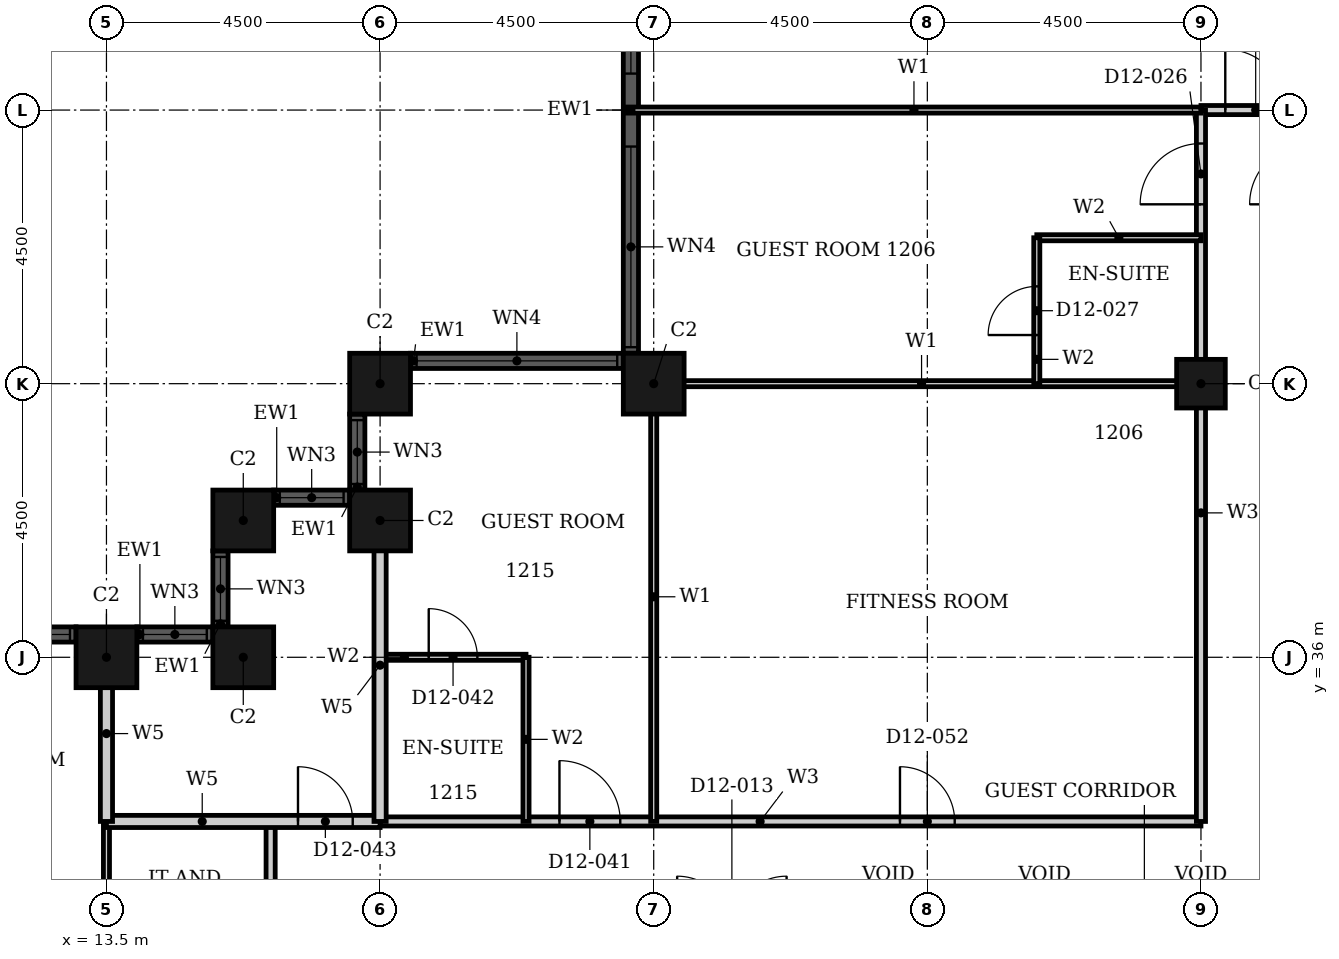
"""IFC4 building model, lengths in metres.
Left out: names, types, materials, properties, quantities, classifications, styles, units other than length and angle.
Written with IfcOpenShell. Run it as: python <this file> out.ifc"""

import sys

from ifc_helpers import new_model, si_unit, direction, frame, frame_2d, origin, origin_2d, place, context, subcontext, project, spatial, rectangle, hollow_rectangle, extrude, element, fill, save


model = new_model("IFC4")
c1 = context("Model", 3, precision=1e-05, world=origin(), true_north=direction((0.0, 1.0)))
c2 = subcontext(c1, "Body", "Model", "MODEL_VIEW")
j1 = project(units=[si_unit("LENGTHUNIT", "METRE"), si_unit("PLANEANGLEUNIT", "RADIAN")], contexts=[c1])
p1 = place(None, origin())
s1 = spatial("IfcSite", under=j1, at=p1, CompositionType="ELEMENT")
p2 = place(p1, origin())
s2 = spatial("IfcBuilding", under=s1, at=p2, CompositionType="ELEMENT")
p3 = place(p2, frame((0.0, 0.0, 56.4)))
s3 = spatial("IfcBuildingStorey", under=s2, at=p3, CompositionType="ELEMENT", Elevation=56.4)
for number, where, z_axis, x_axis in (
    (1, (22.5, 40.5, 0.0), (0.0, 0.0, 1.0), (1.0, 0.0, 0.0)),
    (2, (18.0, 40.5, 0.0), (0.0, 0.0, 1.0), (1.0, 0.0, 0.0)),
    (3, (18.0, 38.25, 0.0), (0.0, 0.0, 1.0), (1.0, 0.0, 0.0)),
    (4, (15.75, 38.25, 0.0), (0.0, 0.0, 1.0), (1.0, 0.0, 0.0)),
    (5, (15.75, 36.0, 0.0), (0.0, 0.0, 1.0), (1.0, 0.0, 0.0)),
    (6, (13.5, 36.0, 0.0), (0.0, 0.0, 1.0), (1.0, 0.0, 0.0)),
):
    element("IfcColumn", number, at=place(p3, frame(where, z_axis=z_axis, x_axis=x_axis)), inside=s3, PredefinedType="COLUMN", context=c2, shape_type="SweptSolid", body=[
        extrude(hollow_rectangle(XDim=1.0, YDim=1.0, WallThickness=0.032, at=origin_2d()), origin(), (0.0, 0.0, 1.0), 3.6),
    ])
p4 = place(p3, frame((31.5, 40.5, 0.0), z_axis=(0.0, 0.0, 1.0), x_axis=(1.0, 0.0, 0.0)))
e7 = element("IfcColumn", 7, at=p4, inside=s3, PredefinedType="COLUMN", context=c2, shape_type="SweptSolid", body=[
    extrude(hollow_rectangle(XDim=0.8, YDim=0.8, WallThickness=0.025, at=origin_2d()), origin(), (0.0, 0.0, 1.0), 3.6),
])
p5 = place(p3, frame((22.125, 49.0, 0.0), z_axis=(0.0, 0.0, 1.0), x_axis=(0.0, -1.0, 0.0)))
e8 = element("IfcWall", 8, at=p5, inside=s3, PredefinedType="SOLIDWALL", context=c2, shape_type="SweptSolid", body=[
    extrude(rectangle(XDim=8.0, YDim=0.25, at=frame_2d((4.0, 0.0))), origin(), (0.0, 0.0, 1.0), 3.6),
])
p6 = place(p5, frame((0.1, 0.0, 0.9)))
e9 = element("IfcOpeningElement", 9, at=p6, cuts=e8, PredefinedType="OPENING", context=c2, shape_type="SweptSolid", body=[
    extrude(rectangle(XDim=3.3, YDim=2.08, at=frame_2d((1.65, 1.04))), frame((0.0, 0.135, 0.0), z_axis=(0.0, -1.0, 0.0), x_axis=(1.0, 0.0, 0.0)), (0.0, 0.0, 1.0), 0.27),
])
p7 = place(p5, frame((4.6, 0.0, 0.9)))
e10 = element("IfcOpeningElement", 10, at=p7, cuts=e8, PredefinedType="OPENING", context=c2, shape_type="SweptSolid", body=[
    extrude(rectangle(XDim=3.3, YDim=2.08, at=frame_2d((1.65, 1.04))), frame((0.0, 0.135, 0.0), z_axis=(0.0, -1.0, 0.0), x_axis=(1.0, 0.0, 0.0)), (0.0, 0.0, 1.0), 0.27),
])
p8 = place(p3, frame((22.0, 40.875, 0.0), z_axis=(0.0, 0.0, 1.0), x_axis=(-1.0, 0.0, 0.0)))
e11 = element("IfcWall", 11, at=p8, inside=s3, PredefinedType="SOLIDWALL", context=c2, shape_type="SweptSolid", body=[
    extrude(rectangle(XDim=3.5, YDim=0.25, at=frame_2d((1.75, 0.0))), origin(), (0.0, 0.0, 1.0), 3.6),
])
p9 = place(p8, frame((0.1, 0.0, 0.9)))
e12 = element("IfcOpeningElement", 12, at=p9, cuts=e11, PredefinedType="OPENING", context=c2, shape_type="SweptSolid", body=[
    extrude(rectangle(XDim=3.3, YDim=2.08, at=frame_2d((1.65, 1.04))), frame((0.0, 0.135, 0.0), z_axis=(0.0, -1.0, 0.0), x_axis=(1.0, 0.0, 0.0)), (0.0, 0.0, 1.0), 0.27),
])
p10 = place(p3, frame((17.625, 40.0, 0.0), z_axis=(0.0, 0.0, 1.0), x_axis=(0.0, -1.0, 0.0)))
e13 = element("IfcWall", 13, at=p10, inside=s3, PredefinedType="SOLIDWALL", context=c2, shape_type="SweptSolid", body=[
    extrude(rectangle(XDim=1.25, YDim=0.25, at=frame_2d((0.625, 0.0))), origin(), (0.0, 0.0, 1.0), 3.6),
])
p11 = place(p10, frame((0.1, 0.0, 0.9)))
e14 = element("IfcOpeningElement", 14, at=p11, cuts=e13, PredefinedType="OPENING", context=c2, shape_type="SweptSolid", body=[
    extrude(rectangle(XDim=1.05, YDim=2.08, at=frame_2d((0.525, 1.04))), frame((0.0, 0.135, 0.0), z_axis=(0.0, -1.0, 0.0), x_axis=(1.0, 0.0, 0.0)), (0.0, 0.0, 1.0), 0.27),
])
p12 = place(p3, frame((17.5, 38.625, 0.0), z_axis=(0.0, 0.0, 1.0), x_axis=(-1.0, 0.0, 0.0)))
e15 = element("IfcWall", 15, at=p12, inside=s3, PredefinedType="SOLIDWALL", context=c2, shape_type="SweptSolid", body=[
    extrude(rectangle(XDim=1.25, YDim=0.25, at=frame_2d((0.625, 0.0))), origin(), (0.0, 0.0, 1.0), 3.6),
])
p13 = place(p12, frame((0.1, 0.0, 0.9)))
e16 = element("IfcOpeningElement", 16, at=p13, cuts=e15, PredefinedType="OPENING", context=c2, shape_type="SweptSolid", body=[
    extrude(rectangle(XDim=1.05, YDim=2.08, at=frame_2d((0.525, 1.04))), frame((0.0, 0.135, 0.0), z_axis=(0.0, -1.0, 0.0), x_axis=(1.0, 0.0, 0.0)), (0.0, 0.0, 1.0), 0.27),
])
p14 = place(p3, frame((15.375, 37.75, 0.0), z_axis=(0.0, 0.0, 1.0), x_axis=(0.0, -1.0, 0.0)))
e17 = element("IfcWall", 17, at=p14, inside=s3, PredefinedType="SOLIDWALL", context=c2, shape_type="SweptSolid", body=[
    extrude(rectangle(XDim=1.25, YDim=0.25, at=frame_2d((0.625, 0.0))), origin(), (0.0, 0.0, 1.0), 3.6),
])
p15 = place(p14, frame((0.1, 0.0, 0.9)))
e18 = element("IfcOpeningElement", 18, at=p15, cuts=e17, PredefinedType="OPENING", context=c2, shape_type="SweptSolid", body=[
    extrude(rectangle(XDim=1.05, YDim=2.08, at=frame_2d((0.525, 1.04))), frame((0.0, 0.135, 0.0), z_axis=(0.0, -1.0, 0.0), x_axis=(1.0, 0.0, 0.0)), (0.0, 0.0, 1.0), 0.27),
])
p16 = place(p3, frame((15.25, 36.375, 0.0), z_axis=(0.0, 0.0, 1.0), x_axis=(-1.0, 0.0, 0.0)))
e19 = element("IfcWall", 19, at=p16, inside=s3, PredefinedType="SOLIDWALL", context=c2, shape_type="SweptSolid", body=[
    extrude(rectangle(XDim=1.25, YDim=0.25, at=frame_2d((0.625, 0.0))), origin(), (0.0, 0.0, 1.0), 3.6),
])
p17 = place(p16, frame((0.1, 0.0, 0.9)))
e20 = element("IfcOpeningElement", 20, at=p17, cuts=e19, PredefinedType="OPENING", context=c2, shape_type="SweptSolid", body=[
    extrude(rectangle(XDim=1.05, YDim=2.08, at=frame_2d((0.525, 1.04))), frame((0.0, 0.135, 0.0), z_axis=(0.0, -1.0, 0.0), x_axis=(1.0, 0.0, 0.0)), (0.0, 0.0, 1.0), 0.27),
])
p18 = place(p3, frame((13.0, 36.375, 0.0), z_axis=(0.0, 0.0, 1.0), x_axis=(-1.0, 0.0, 0.0)))
e21 = element("IfcWall", 21, at=p18, inside=s3, PredefinedType="SOLIDWALL", context=c2, shape_type="SweptSolid", body=[
    extrude(rectangle(XDim=8.0, YDim=0.25, at=frame_2d((4.0, 0.0))), origin(), (0.0, 0.0, 1.0), 3.6),
])
p19 = place(p18, frame((0.1, 0.0, 0.9)))
e22 = element("IfcOpeningElement", 22, at=p19, cuts=e21, PredefinedType="OPENING", context=c2, shape_type="SweptSolid", body=[
    extrude(rectangle(XDim=3.3, YDim=2.08, at=frame_2d((1.65, 1.04))), frame((0.0, 0.135, 0.0), z_axis=(0.0, -1.0, 0.0), x_axis=(1.0, 0.0, 0.0)), (0.0, 0.0, 1.0), 0.27),
])
p20 = place(p18, frame((4.6, 0.0, 0.9)))
e23 = element("IfcOpeningElement", 23, at=p20, cuts=e21, PredefinedType="OPENING", context=c2, shape_type="SweptSolid", body=[
    extrude(rectangle(XDim=3.3, YDim=2.08, at=frame_2d((1.65, 1.04))), frame((0.0, 0.135, 0.0), z_axis=(0.0, -1.0, 0.0), x_axis=(1.0, 0.0, 0.0)), (0.0, 0.0, 1.0), 0.27),
])
p21 = place(p3, frame((18.0, 33.3, 0.0), z_axis=(0.0, 0.0, 1.0), x_axis=(1.0, 0.0, 0.0)))
e24 = element("IfcWall", 24, at=p21, inside=s3, PredefinedType="PARTITIONING", context=c2, shape_type="SweptSolid", body=[
    extrude(rectangle(XDim=13.5, YDim=0.15, at=frame_2d((6.75, 0.0))), origin(), (0.0, 0.0, 1.0), 3.3),
])
p22 = place(p21, frame((2.95, 0.0, 0.0)))
e25 = element("IfcOpeningElement", 25, at=p22, cuts=e24, PredefinedType="OPENING", context=c2, shape_type="SweptSolid", body=[
    extrude(rectangle(XDim=1.0, YDim=2.1, at=frame_2d((0.5, 1.05))), frame((0.0, 0.085, 0.0), z_axis=(0.0, -1.0, 0.0), x_axis=(1.0, 0.0, 0.0)), (0.0, 0.0, 1.0), 0.17),
])
p23 = place(p21, frame((8.55, 0.0, 0.0)))
e26 = element("IfcOpeningElement", 26, at=p23, cuts=e24, PredefinedType="OPENING", context=c2, shape_type="SweptSolid", body=[
    extrude(rectangle(XDim=0.9, YDim=2.1, at=frame_2d((0.45, 1.05))), frame((0.0, 0.085, 0.0), z_axis=(0.0, -1.0, 0.0), x_axis=(1.0, 0.0, 0.0)), (0.0, 0.0, 1.0), 0.17),
])
p24 = place(p3, frame((31.5, 45.0, 0.0), z_axis=(0.0, 0.0, 1.0), x_axis=(1.0, 0.0, 0.0)))
e27 = element("IfcWall", 27, at=p24, inside=s3, PredefinedType="PARTITIONING", context=c2, shape_type="SweptSolid", body=[
    extrude(rectangle(XDim=1.8, YDim=0.15, at=frame_2d((0.9, 0.0))), origin(), (0.0, 0.0, 1.0), 3.3),
])
p25 = place(p24, frame((0.4, 0.0, 0.0)))
e28 = element("IfcOpeningElement", 28, at=p25, cuts=e27, PredefinedType="OPENING", context=c2, shape_type="SweptSolid", body=[
    extrude(rectangle(XDim=1.0, YDim=2.1, at=frame_2d((0.5, 1.05))), frame((0.0, 0.085, 0.0), z_axis=(0.0, -1.0, 0.0), x_axis=(1.0, 0.0, 0.0)), (0.0, 0.0, 1.0), 0.17),
])
p26 = place(p3, frame((16.2, 27.0, 0.0), z_axis=(0.0, 0.0, 1.0), x_axis=(0.0, 1.0, 0.0)))
e29 = element("IfcWall", 29, at=p26, inside=s3, PredefinedType="PARTITIONING", context=c2, shape_type="SweptSolid", body=[
    extrude(rectangle(XDim=6.3, YDim=0.15, at=frame_2d((3.15, 0.0))), origin(), (0.0, 0.0, 1.0), 3.3),
])
p27 = place(p26, frame((2.55, 0.0, 0.0)))
e30 = element("IfcOpeningElement", 30, at=p27, cuts=e29, PredefinedType="OPENING", context=c2, shape_type="SweptSolid", body=[
    extrude(rectangle(XDim=0.9, YDim=2.1, at=frame_2d((0.45, 1.05))), frame((0.0, 0.085, 0.0), z_axis=(0.0, -1.0, 0.0), x_axis=(1.0, 0.0, 0.0)), (0.0, 0.0, 1.0), 0.17),
])
p28 = place(p3, frame((31.5, 33.3, 0.0), z_axis=(0.0, 0.0, 1.0), x_axis=(0.0, 1.0, 0.0)))
e31 = element("IfcWall", 31, at=p28, inside=s3, PredefinedType="PARTITIONING", context=c2, shape_type="SweptSolid", body=[
    extrude(rectangle(XDim=11.7, YDim=0.15, at=frame_2d((5.85, 0.0))), origin(), (0.0, 0.0, 1.0), 2.58),
])
p29 = place(p28, frame((10.15, 0.0, 0.0)))
e32 = element("IfcOpeningElement", 32, at=p29, cuts=e31, PredefinedType="OPENING", context=c2, shape_type="SweptSolid", body=[
    extrude(rectangle(XDim=1.0, YDim=2.1, at=frame_2d((0.5, 1.05))), frame((0.0, 0.085, 0.0), z_axis=(0.0, -1.0, 0.0), x_axis=(1.0, 0.0, 0.0)), (0.0, 0.0, 1.0), 0.17),
])
p30 = place(p3, frame((22.31, 40.5, 0.0), z_axis=(0.0, 0.0, 1.0), x_axis=(1.0, 0.0, 0.0)))
e33 = element("IfcWall", 33, at=p30, inside=s3, PredefinedType="PARTITIONING", context=c2, shape_type="SweptSolid", body=[
    extrude(rectangle(XDim=9.19, YDim=0.1, at=frame_2d((4.595, 0.0))), origin(), (0.0, 0.0, 1.0), 2.38),
])
p31 = place(p3, frame((22.06, 45.0, 0.0), z_axis=(0.0, 0.0, 1.0), x_axis=(1.0, 0.0, 0.0)))
e34 = element("IfcWall", 34, at=p31, inside=s3, PredefinedType="PARTITIONING", context=c2, shape_type="SweptSolid", body=[
    extrude(rectangle(XDim=9.44, YDim=0.1, at=frame_2d((4.72, 0.0))), origin(), (0.0, 0.0, 1.0), 3.3),
])
p32 = place(p3, frame((13.5, 27.0, 0.0), z_axis=(0.0, 0.0, 1.0), x_axis=(0.0, 1.0, 0.0)))
e35 = element("IfcWall", 35, at=p32, inside=s3, PredefinedType="PARTITIONING", context=c2, shape_type="SweptSolid", body=[
    extrude(rectangle(XDim=6.3, YDim=0.1, at=frame_2d((3.15, 0.0))), origin(), (0.0, 0.0, 1.0), 2.38),
])
p33 = place(p3, frame((22.5, 33.3, 0.0), z_axis=(0.0, 0.0, 1.0), x_axis=(0.0, 1.0, 0.0)))
e36 = element("IfcWall", 36, at=p33, inside=s3, PredefinedType="PARTITIONING", context=c2, shape_type="SweptSolid", body=[
    extrude(rectangle(XDim=7.39, YDim=0.1, at=frame_2d((3.695, 0.0))), origin(), (0.0, 0.0, 1.0), 3.3),
])
p34 = place(p3, frame((18.0, 36.0, 0.0), z_axis=(0.0, 0.0, 1.0), x_axis=(1.0, 0.0, 0.0)))
e37 = element("IfcWall", 37, at=p34, inside=s3, PredefinedType="PARTITIONING", context=c2, shape_type="SweptSolid", body=[
    extrude(rectangle(XDim=2.4, YDim=0.1, at=frame_2d((1.2, 0.0))), origin(), (0.0, 0.0, 1.0), 3.3),
])
p35 = place(p34, frame((0.8, 0.0, 0.0)))
e38 = element("IfcOpeningElement", 38, at=p35, cuts=e37, PredefinedType="OPENING", context=c2, shape_type="SweptSolid", body=[
    extrude(rectangle(XDim=0.8, YDim=2.1, at=frame_2d((0.4, 1.05))), frame((0.0, 0.06, 0.0), z_axis=(0.0, -1.0, 0.0), x_axis=(1.0, 0.0, 0.0)), (0.0, 0.0, 1.0), 0.12),
])
for number, where, z_axis, x_axis in (
    (39, (28.8, 42.9, 0.0), (0.0, 0.0, 1.0), (1.0, 0.0, 0.0)),
    (40, (20.4, 33.3, 0.0), (0.0, 0.0, 1.0), (0.0, 1.0, 0.0)),
):
    element("IfcWall", number, at=place(p3, frame(where, z_axis=z_axis, x_axis=x_axis)), inside=s3, PredefinedType="PARTITIONING", context=c2, shape_type="SweptSolid", body=[
        extrude(rectangle(XDim=2.7, YDim=0.1, at=frame_2d((1.35, 0.0))), origin(), (0.0, 0.0, 1.0), 3.3),
    ])
p36 = place(p3, frame((28.8, 40.5, 0.0), z_axis=(0.0, 0.0, 1.0), x_axis=(0.0, 1.0, 0.0)))
e41 = element("IfcWall", 41, at=p36, inside=s3, PredefinedType="PARTITIONING", context=c2, shape_type="SweptSolid", body=[
    extrude(rectangle(XDim=2.4, YDim=0.1, at=frame_2d((1.2, 0.0))), origin(), (0.0, 0.0, 1.0), 3.3),
])
p37 = place(p36, frame((0.8, 0.0, 0.0)))
e42 = element("IfcOpeningElement", 42, at=p37, cuts=e41, PredefinedType="OPENING", context=c2, shape_type="SweptSolid", body=[
    extrude(rectangle(XDim=0.8, YDim=2.1, at=frame_2d((0.4, 1.05))), frame((0.0, 0.06, 0.0), z_axis=(0.0, -1.0, 0.0), x_axis=(1.0, 0.0, 0.0)), (0.0, 0.0, 1.0), 0.12),
])
p38 = place(p3, frame((13.5, 33.3, 0.0), z_axis=(0.0, 0.0, 1.0), x_axis=(1.0, 0.0, 0.0)))
e43 = element("IfcWall", 43, at=p38, inside=s3, PredefinedType="PARTITIONING", context=c2, shape_type="SweptSolid", body=[
    extrude(rectangle(XDim=4.5, YDim=0.2, at=frame_2d((2.25, 0.0))), origin(), (0.0, 0.0, 1.0), 3.3),
])
p39 = place(p38, frame((3.15, 0.0, 0.0)))
e44 = element("IfcOpeningElement", 44, at=p39, cuts=e43, PredefinedType="OPENING", context=c2, shape_type="SweptSolid", body=[
    extrude(rectangle(XDim=0.9, YDim=2.1, at=frame_2d((0.45, 1.05))), frame((0.0, 0.11, 0.0), z_axis=(0.0, -1.0, 0.0), x_axis=(1.0, 0.0, 0.0)), (0.0, 0.0, 1.0), 0.22),
])
p40 = place(p3, frame((13.5, 33.3, 0.0), z_axis=(0.0, 0.0, 1.0), x_axis=(0.0, 1.0, 0.0)))
e45 = element("IfcWall", 45, at=p40, inside=s3, PredefinedType="PARTITIONING", context=c2, shape_type="SweptSolid", body=[
    extrude(rectangle(XDim=2.89, YDim=0.2, at=frame_2d((1.445, 0.0))), origin(), (0.0, 0.0, 1.0), 2.38),
])
p41 = place(p3, frame((18.0, 33.3, 0.0), z_axis=(0.0, 0.0, 1.0), x_axis=(0.0, 1.0, 0.0)))
e46 = element("IfcWall", 46, at=p41, inside=s3, PredefinedType="PARTITIONING", context=c2, shape_type="SweptSolid", body=[
    extrude(rectangle(XDim=5.14, YDim=0.2, at=frame_2d((2.57, 0.0))), origin(), (0.0, 0.0, 1.0), 3.3),
])
p42 = place(p6, origin())
e47 = element("IfcWindow", 47, at=p42, inside=s3, PartitioningType="SINGLE_PANEL", PredefinedType="WINDOW", context=c2, shape_type="SweptSolid", body=[
    extrude(rectangle(XDim=3.3, YDim=2.08, at=frame_2d((1.65, 1.04))), frame((0.0, 0.03, 0.0), z_axis=(0.0, -1.0, 0.0), x_axis=(1.0, 0.0, 0.0)), (0.0, 0.0, 1.0), 0.06),
])
fill(e9, e47)
p43 = place(p7, origin())
e48 = element("IfcWindow", 48, at=p43, inside=s3, PartitioningType="SINGLE_PANEL", PredefinedType="WINDOW", context=c2, shape_type="SweptSolid", body=[
    extrude(rectangle(XDim=3.3, YDim=2.08, at=frame_2d((1.65, 1.04))), frame((0.0, 0.03, 0.0), z_axis=(0.0, -1.0, 0.0), x_axis=(1.0, 0.0, 0.0)), (0.0, 0.0, 1.0), 0.06),
])
fill(e10, e48)
p44 = place(p9, origin())
e49 = element("IfcWindow", 49, at=p44, inside=s3, PartitioningType="SINGLE_PANEL", PredefinedType="WINDOW", context=c2, shape_type="SweptSolid", body=[
    extrude(rectangle(XDim=3.3, YDim=2.08, at=frame_2d((1.65, 1.04))), frame((0.0, 0.03, 0.0), z_axis=(0.0, -1.0, 0.0), x_axis=(1.0, 0.0, 0.0)), (0.0, 0.0, 1.0), 0.06),
])
fill(e12, e49)
p45 = place(p11, origin())
e50 = element("IfcWindow", 50, at=p45, inside=s3, PartitioningType="SINGLE_PANEL", PredefinedType="WINDOW", context=c2, shape_type="SweptSolid", body=[
    extrude(rectangle(XDim=1.05, YDim=2.08, at=frame_2d((0.525, 1.04))), frame((0.0, 0.03, 0.0), z_axis=(0.0, -1.0, 0.0), x_axis=(1.0, 0.0, 0.0)), (0.0, 0.0, 1.0), 0.06),
])
fill(e14, e50)
p46 = place(p13, origin())
e51 = element("IfcWindow", 51, at=p46, inside=s3, PartitioningType="SINGLE_PANEL", PredefinedType="WINDOW", context=c2, shape_type="SweptSolid", body=[
    extrude(rectangle(XDim=1.05, YDim=2.08, at=frame_2d((0.525, 1.04))), frame((0.0, 0.03, 0.0), z_axis=(0.0, -1.0, 0.0), x_axis=(1.0, 0.0, 0.0)), (0.0, 0.0, 1.0), 0.06),
])
fill(e16, e51)
p47 = place(p15, origin())
e52 = element("IfcWindow", 52, at=p47, inside=s3, PartitioningType="SINGLE_PANEL", PredefinedType="WINDOW", context=c2, shape_type="SweptSolid", body=[
    extrude(rectangle(XDim=1.05, YDim=2.08, at=frame_2d((0.525, 1.04))), frame((0.0, 0.03, 0.0), z_axis=(0.0, -1.0, 0.0), x_axis=(1.0, 0.0, 0.0)), (0.0, 0.0, 1.0), 0.06),
])
fill(e18, e52)
p48 = place(p17, origin())
e53 = element("IfcWindow", 53, at=p48, inside=s3, PartitioningType="SINGLE_PANEL", PredefinedType="WINDOW", context=c2, shape_type="SweptSolid", body=[
    extrude(rectangle(XDim=1.05, YDim=2.08, at=frame_2d((0.525, 1.04))), frame((0.0, 0.03, 0.0), z_axis=(0.0, -1.0, 0.0), x_axis=(1.0, 0.0, 0.0)), (0.0, 0.0, 1.0), 0.06),
])
fill(e20, e53)
p49 = place(p19, origin())
e54 = element("IfcWindow", 54, at=p49, inside=s3, PartitioningType="SINGLE_PANEL", PredefinedType="WINDOW", context=c2, shape_type="SweptSolid", body=[
    extrude(rectangle(XDim=3.3, YDim=2.08, at=frame_2d((1.65, 1.04))), frame((0.0, 0.03, 0.0), z_axis=(0.0, -1.0, 0.0), x_axis=(1.0, 0.0, 0.0)), (0.0, 0.0, 1.0), 0.06),
])
fill(e22, e54)
p50 = place(p29, origin())
e55 = element("IfcDoor", 55, at=p50, inside=s3, OperationType="SINGLE_SWING_RIGHT", PredefinedType="DOOR", context=c2, shape_type="SweptSolid", body=[
    extrude(rectangle(XDim=1.0, YDim=2.1, at=frame_2d((0.5, 1.05))), frame((0.0, 0.025, 0.0), z_axis=(0.0, -1.0, 0.0), x_axis=(1.0, 0.0, 0.0)), (0.0, 0.0, 1.0), 0.05),
])
fill(e32, e55)
p51 = place(p37, origin())
e56 = element("IfcDoor", 56, at=p51, inside=s3, OperationType="SINGLE_SWING_LEFT", PredefinedType="DOOR", context=c2, shape_type="SweptSolid", body=[
    extrude(rectangle(XDim=0.8, YDim=2.1, at=frame_2d((0.4, 1.05))), frame((0.0, 0.025, 0.0), z_axis=(0.0, -1.0, 0.0), x_axis=(1.0, 0.0, 0.0)), (0.0, 0.0, 1.0), 0.05),
])
fill(e42, e56)
p52 = place(p25, origin())
e57 = element("IfcDoor", 57, at=p52, inside=s3, OperationType="SINGLE_SWING_LEFT", PredefinedType="DOOR", context=c2, shape_type="SweptSolid", body=[
    extrude(rectangle(XDim=1.0, YDim=2.1, at=frame_2d((0.5, 1.05))), frame((0.0, 0.025, 0.0), z_axis=(0.0, -1.0, 0.0), x_axis=(1.0, 0.0, 0.0)), (0.0, 0.0, 1.0), 0.05),
])
fill(e28, e57)
p53 = place(p22, origin())
e58 = element("IfcDoor", 58, at=p53, inside=s3, OperationType="SINGLE_SWING_RIGHT", PredefinedType="DOOR", context=c2, shape_type="SweptSolid", body=[
    extrude(rectangle(XDim=1.0, YDim=2.1, at=frame_2d((0.5, 1.05))), frame((0.0, 0.025, 0.0), z_axis=(0.0, -1.0, 0.0), x_axis=(1.0, 0.0, 0.0)), (0.0, 0.0, 1.0), 0.05),
])
fill(e25, e58)
p54 = place(p35, origin())
e59 = element("IfcDoor", 59, at=p54, inside=s3, OperationType="SINGLE_SWING_LEFT", PredefinedType="DOOR", context=c2, shape_type="SweptSolid", body=[
    extrude(rectangle(XDim=0.8, YDim=2.1, at=frame_2d((0.4, 1.05))), frame((0.0, 0.025, 0.0), z_axis=(0.0, -1.0, 0.0), x_axis=(1.0, 0.0, 0.0)), (0.0, 0.0, 1.0), 0.05),
])
fill(e38, e59)
p55 = place(p39, origin())
e60 = element("IfcDoor", 60, at=p55, inside=s3, OperationType="SINGLE_SWING_LEFT", PredefinedType="DOOR", context=c2, shape_type="SweptSolid", body=[
    extrude(rectangle(XDim=0.9, YDim=2.1, at=frame_2d((0.45, 1.05))), frame((0.0, 0.025, 0.0), z_axis=(0.0, -1.0, 0.0), x_axis=(1.0, 0.0, 0.0)), (0.0, 0.0, 1.0), 0.05),
])
fill(e44, e60)
p56 = place(p23, origin())
e61 = element("IfcDoor", 61, at=p56, inside=s3, OperationType="SINGLE_SWING_LEFT", PredefinedType="DOOR", context=c2, shape_type="SweptSolid", body=[
    extrude(rectangle(XDim=0.9, YDim=2.1, at=frame_2d((0.45, 1.05))), frame((0.0, 0.025, 0.0), z_axis=(0.0, -1.0, 0.0), x_axis=(1.0, 0.0, 0.0)), (0.0, 0.0, 1.0), 0.05),
])
fill(e26, e61)
save(model, sys.argv[1])
